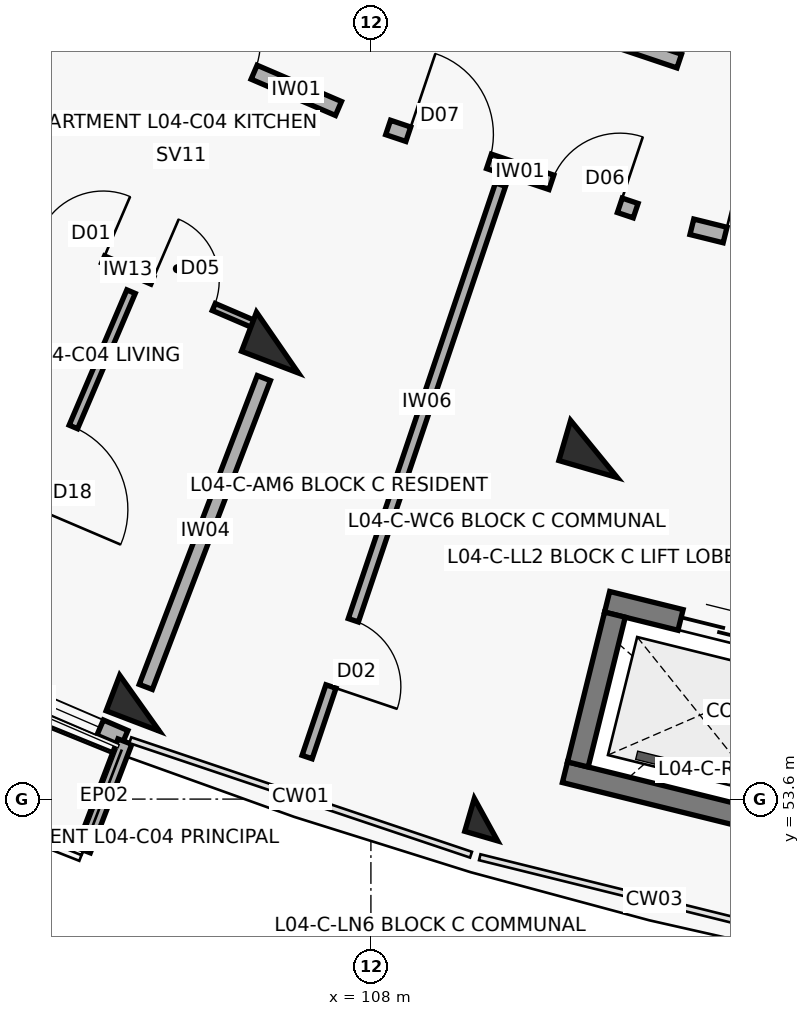
"""IFC4 building model, lengths in metres.
Left out: names, types, materials, properties, quantities, classifications, styles, units other than length and angle.
Written with IfcOpenShell. Run it as: python <this file> out.ifc"""

import sys

from ifc_helpers import new_model, si_unit, direction, frame, frame_2d, origin, origin_2d, place, context, subcontext, project, spatial, rectangle, extrude, element, fill, save


model = new_model("IFC4")
c1 = context("Model", 3, precision=1e-05, world=origin(), true_north=direction((0.0, 1.0)))
c2 = subcontext(c1, "Body", "Model", "MODEL_VIEW")
j1 = project(units=[si_unit("LENGTHUNIT", "METRE"), si_unit("PLANEANGLEUNIT", "RADIAN")], contexts=[c1])
p1 = place(None, origin())
s1 = spatial("IfcSite", under=j1, at=p1, CompositionType="ELEMENT")
p2 = place(p1, origin())
s2 = spatial("IfcBuilding", under=s1, at=p2, CompositionType="ELEMENT")
p3 = place(p2, frame((0.0, 0.0, 14.3)))
s3 = spatial("IfcBuildingStorey", under=s2, at=p3, CompositionType="ELEMENT", Elevation=14.3)
p4 = place(p3, frame((106.77, 59.606, 0.0), z_axis=(0.0, 0.0, 1.0), x_axis=(-0.357064076459, -0.934079892355, 0.0)))
e1 = element("IfcColumn", 1, at=p4, inside=s3, PredefinedType="COLUMN", context=c2, shape_type="SweptSolid", body=[
    extrude(rectangle(XDim=0.55, YDim=0.8, at=origin_2d()), origin(), (0.0, 0.0, 1.0), 3.1),
])
p5 = place(p3, frame((104.956, 54.861, 0.0), z_axis=(0.0, 0.0, 1.0), x_axis=(-0.357064076459, -0.934079892355, 0.0)))
e2 = element("IfcColumn", 2, at=p5, inside=s3, PredefinedType="COLUMN", context=c2, shape_type="SweptSolid", body=[
    extrude(rectangle(XDim=0.5, YDim=0.75, at=origin_2d()), origin(), (0.0, 0.0, 1.0), 3.1),
])
p6 = place(p3, frame((110.934, 58.207, 0.0), z_axis=(0.0, 0.0, 1.0), x_axis=(-0.27966144946, -0.96009867914, 0.0)))
e3 = element("IfcColumn", 3, at=p6, inside=s3, PredefinedType="COLUMN", context=c2, shape_type="SweptSolid", body=[
    extrude(rectangle(XDim=0.55, YDim=0.8, at=origin_2d()), origin(), (0.0, 0.0, 1.0), 3.1),
])
p7 = place(p3, frame((109.513, 53.329, 0.0), z_axis=(0.0, 0.0, 1.0), x_axis=(-0.27966144946, -0.96009867914, 0.0)))
e4 = element("IfcColumn", 4, at=p7, inside=s3, PredefinedType="COLUMN", context=c2, shape_type="SweptSolid", body=[
    extrude(rectangle(XDim=0.45, YDim=0.45, at=origin_2d()), origin(), (0.0, 0.0, 1.0), 3.1),
])
p8 = place(p3, frame((100.341, 56.301, 0.0), z_axis=(0.0, 0.0, 1.0), x_axis=(0.918737524932, -0.39486878869, 0.0)))
e5 = element("IfcWall", 5, at=p8, inside=s3, PredefinedType="SOLIDWALL", context=c2, shape_type="SweptSolid", body=[
    extrude(rectangle(XDim=4.809, YDim=0.218, at=frame_2d((2.405, 0.0))), origin(), (0.0, 0.0, 1.0), 2.25),
])
p9 = place(p8, frame((0.4, 0.0, 0.0)))
e6 = element("IfcOpeningElement", 6, at=p9, cuts=e5, PredefinedType="OPENING", context=c2, shape_type="SweptSolid", body=[
    extrude(rectangle(XDim=1.1, YDim=2.15, at=frame_2d((0.55, 1.075))), frame((0.0, 0.119, 0.0), z_axis=(0.0, -1.0, 0.0), x_axis=(1.0, 0.0, 0.0)), (0.0, 0.0, 1.0), 0.238),
])
p10 = place(p8, frame((2.659, 0.0, 0.35)))
e7 = element("IfcOpeningElement", 7, at=p10, cuts=e5, PredefinedType="OPENING", context=c2, shape_type="SweptSolid", body=[
    extrude(rectangle(XDim=1.8, YDim=1.65, at=frame_2d((0.9, 0.825))), frame((0.0, 0.119, 0.0), z_axis=(0.0, -1.0, 0.0), x_axis=(1.0, 0.0, 0.0)), (0.0, 0.0, 1.0), 0.238),
])
p11 = place(p3, frame((104.763, 54.357, 0.0), z_axis=(0.0, 0.0, 1.0), x_axis=(-0.356957296461, -0.934120703391, 0.0)))
e8 = element("IfcWall", 8, at=p11, inside=s3, PredefinedType="PARAPET", context=c2, shape_type="SweptSolid", body=[
    extrude(rectangle(XDim=1.53, YDim=0.195, at=frame_2d((0.765, 0.0))), origin(), (0.0, 0.0, 1.0), 2.25),
])
p12 = place(p3, frame((111.108, 56.196, 0.0), z_axis=(0.0, 0.0, 1.0), x_axis=(0.970706856107, -0.240266933861, 0.0)))
e9 = element("IfcWall", 9, at=p12, inside=s3, PredefinedType="SHEAR", context=c2, shape_type="SweptSolid", body=[
    extrude(rectangle(XDim=3.09, YDim=0.28, at=frame_2d((1.545, 0.0))), origin(), (0.0, 0.0, 1.0), 3.1),
])
p13 = place(p12, frame((0.995, 0.0, 0.0)))
e10 = element("IfcOpeningElement", 10, at=p13, cuts=e9, PredefinedType="OPENING", context=c2, shape_type="SweptSolid", body=[
    extrude(rectangle(XDim=1.1, YDim=2.15, at=frame_2d((0.55, 1.075))), frame((0.0, 0.15, 0.0), z_axis=(0.0, -1.0, 0.0), x_axis=(1.0, 0.0, 0.0)), (0.0, 0.0, 1.0), 0.3),
])
p14 = place(p3, frame((110.553, 53.954, 0.0), z_axis=(0.0, 0.0, 1.0), x_axis=(0.970725280816, -0.240192483614, 0.0)))
e11 = element("IfcWall", 11, at=p14, inside=s3, PredefinedType="SHEAR", context=c2, shape_type="SweptSolid", body=[
    extrude(rectangle(XDim=3.09, YDim=0.28, at=frame_2d((1.545, 0.0))), origin(), (0.0, 0.0, 1.0), 3.1),
])
p15 = place(p3, frame((111.21, 56.027, 0.0), z_axis=(0.0, 0.0, 1.0), x_axis=(-0.240186044774, -0.970726873995, 0.0)))
e12 = element("IfcWall", 12, at=p15, inside=s3, PredefinedType="SHEAR", context=c2, shape_type="SweptSolid", body=[
    extrude(rectangle(XDim=2.03, YDim=0.28, at=frame_2d((1.015, 0.0))), origin(), (0.0, 0.0, 1.0), 3.1),
])
p16 = place(p3, frame((104.417, 64.044, 0.0), z_axis=(0.0, 0.0, 1.0), x_axis=(0.918718172399, -0.394913813008, 0.0)))
e13 = element("IfcWall", 13, at=p16, inside=s3, PredefinedType="SOLIDWALL", context=c2, shape_type="SweptSolid", body=[
    extrude(rectangle(XDim=3.436, YDim=0.2, at=frame_2d((1.718, 0.0))), origin(), (0.0, 0.0, 1.0), 2.08),
])
p17 = place(p16, frame((1.208, 0.0, 0.0)))
e14 = element("IfcOpeningElement", 14, at=p17, cuts=e13, PredefinedType="OPENING", context=c2, shape_type="SweptSolid", body=[
    extrude(rectangle(XDim=1.02, YDim=2.15, at=frame_2d((0.51, 1.075))), frame((0.0, 0.11, 0.0), z_axis=(0.0, -1.0, 0.0), x_axis=(1.0, 0.0, 0.0)), (0.0, 0.0, 1.0), 0.22),
])
p18 = place(p3, frame((103.052, 61.313, 0.0), z_axis=(0.0, 0.0, 1.0), x_axis=(0.918714121981, -0.39492323567, 0.0)))
e15 = element("IfcWall", 15, at=p18, inside=s3, PredefinedType="PARTITIONING", context=c2, shape_type="SweptSolid", body=[
    extrude(rectangle(XDim=3.785, YDim=0.1, at=frame_2d((1.893, 0.0))), origin(), (0.0, 0.0, 1.0), 2.08),
])
p19 = place(p18, frame((0.65, 0.0, 0.0)))
e16 = element("IfcOpeningElement", 16, at=p19, cuts=e15, PredefinedType="OPENING", context=c2, shape_type="SweptSolid", body=[
    extrude(rectangle(XDim=0.9, YDim=2.1, at=frame_2d((0.45, 1.05))), frame((0.0, 0.06, 0.0), z_axis=(0.0, -1.0, 0.0), x_axis=(1.0, 0.0, 0.0)), (0.0, 0.0, 1.0), 0.12),
])
p20 = place(p18, frame((2.255, 0.0, 0.0)))
e17 = element("IfcOpeningElement", 17, at=p20, cuts=e15, PredefinedType="OPENING", context=c2, shape_type="SweptSolid", body=[
    extrude(rectangle(XDim=0.88, YDim=2.1, at=frame_2d((0.44, 1.05))), frame((0.0, 0.06, 0.0), z_axis=(0.0, -1.0, 0.0), x_axis=(1.0, 0.0, 0.0)), (0.0, 0.0, 1.0), 0.12),
])
p21 = place(p3, frame((104.844, 60.277, 0.0), z_axis=(0.0, 0.0, 1.0), x_axis=(-0.392127280422, -0.919910971751, 0.0)))
e18 = element("IfcWall", 18, at=p21, inside=s3, PredefinedType="PARTITIONING", context=c2, shape_type="SweptSolid", body=[
    extrude(rectangle(XDim=5.05, YDim=0.12, at=frame_2d((2.525, 0.0))), origin(), (0.0, 0.0, 1.0), 2.08),
])
p22 = place(p21, frame((1.935, 0.0, 0.0)))
e19 = element("IfcOpeningElement", 19, at=p22, cuts=e18, PredefinedType="OPENING", context=c2, shape_type="SweptSolid", body=[
    extrude(rectangle(XDim=1.18, YDim=2.1, at=frame_2d((0.59, 1.05))), frame((0.0, 0.07, 0.0), z_axis=(0.0, -1.0, 0.0), x_axis=(1.0, 0.0, 0.0)), (0.0, 0.0, 1.0), 0.14),
])
p23 = place(p3, frame((108.227, 62.437, 0.0), z_axis=(0.0, 0.0, 1.0), x_axis=(0.947884468821, -0.318614239745, 0.0)))
e20 = element("IfcWall", 20, at=p23, inside=s3, PredefinedType="SOLIDWALL", context=c2, shape_type="SweptSolid", body=[
    extrude(rectangle(XDim=3.436, YDim=0.2, at=frame_2d((1.718, 0.0))), origin(), (0.0, 0.0, 1.0), 2.08),
])
p24 = place(p23, frame((0.28, 0.0, 0.0)))
e21 = element("IfcOpeningElement", 21, at=p24, cuts=e20, PredefinedType="OPENING", context=c2, shape_type="SweptSolid", body=[
    extrude(rectangle(XDim=1.12, YDim=2.15, at=frame_2d((0.56, 1.075))), frame((0.0, 0.11, 0.0), z_axis=(0.0, -1.0, 0.0), x_axis=(1.0, 0.0, 0.0)), (0.0, 0.0, 1.0), 0.22),
])
p25 = place(p23, frame((2.266, 0.0, 0.0)))
e22 = element("IfcOpeningElement", 22, at=p25, cuts=e20, PredefinedType="OPENING", context=c2, shape_type="SweptSolid", body=[
    extrude(rectangle(XDim=0.95, YDim=2.1, at=frame_2d((0.475, 1.05))), frame((0.0, 0.11, 0.0), z_axis=(0.0, -1.0, 0.0), x_axis=(1.0, 0.0, 0.0)), (0.0, 0.0, 1.0), 0.22),
])
p26 = place(p3, frame((108.958, 64.352, 0.0), z_axis=(0.0, 0.0, 1.0), x_axis=(0.94787351033, -0.318646839643, 0.0)))
e23 = element("IfcWall", 23, at=p26, inside=s3, PredefinedType="SOLIDWALL", context=c2, shape_type="SweptSolid", body=[
    extrude(rectangle(XDim=3.269, YDim=0.19, at=frame_2d((1.634, 0.0))), origin(), (0.0, 0.0, 1.0), 2.08),
])
p27 = place(p26, frame((1.164, 0.0, 0.0)))
e24 = element("IfcOpeningElement", 24, at=p27, cuts=e23, PredefinedType="OPENING", context=c2, shape_type="SweptSolid", body=[
    extrude(rectangle(XDim=0.94, YDim=2.1, at=frame_2d((0.47, 1.05))), frame((0.0, 0.105, 0.0), z_axis=(0.0, -1.0, 0.0), x_axis=(1.0, 0.0, 0.0)), (0.0, 0.0, 1.0), 0.21),
])
p28 = place(p3, frame((109.705, 61.685, 0.0), z_axis=(0.0, 0.0, 1.0), x_axis=(-0.320057771325, -0.947398027766, 0.0)))
e25 = element("IfcWall", 25, at=p28, inside=s3, PredefinedType="PARTITIONING", context=c2, shape_type="SweptSolid", body=[
    extrude(rectangle(XDim=7.95, YDim=0.14, at=frame_2d((3.975, 0.0))), origin(), (0.0, 0.0, 1.0), 2.08),
])
p29 = place(p28, frame((6.05, 0.0, 0.0)))
e26 = element("IfcOpeningElement", 26, at=p29, cuts=e25, PredefinedType="OPENING", context=c2, shape_type="SweptSolid", body=[
    extrude(rectangle(XDim=0.92, YDim=2.1, at=frame_2d((0.46, 1.05))), frame((0.0, 0.08, 0.0), z_axis=(0.0, -1.0, 0.0), x_axis=(1.0, 0.0, 0.0)), (0.0, 0.0, 1.0), 0.16),
])
p30 = place(p3, frame((106.591, 59.139, 0.0), z_axis=(0.0, 0.0, 1.0), x_axis=(-0.357064016205, -0.934079915388, 0.0)))
e27 = element("IfcWall", 27, at=p30, inside=s3, PredefinedType="SOLIDWALL", context=c2, shape_type="SweptSolid", body=[
    extrude(rectangle(XDim=4.35, YDim=0.185, at=frame_2d((2.175, 0.0))), origin(), (0.0, 0.0, 1.0), 2.08),
])
p31 = place(p3, frame((112.223, 61.13, 0.0), z_axis=(0.0, 0.0, 1.0), x_axis=(0.970719238682, -0.240216901263, 0.0)))
e28 = element("IfcWall", 28, at=p31, inside=s3, PredefinedType="SOLIDWALL", context=c2, shape_type="SweptSolid", body=[
    extrude(rectangle(XDim=3.296, YDim=0.21, at=frame_2d((1.648, 0.0))), origin(), (0.0, 0.0, 1.0), 2.08),
])
p32 = place(p31, frame((0.45, 0.0, 0.0)))
e29 = element("IfcOpeningElement", 29, at=p32, cuts=e28, PredefinedType="OPENING", context=c2, shape_type="SweptSolid", body=[
    extrude(rectangle(XDim=1.1, YDim=2.15, at=frame_2d((0.55, 1.075))), frame((0.0, 0.115, 0.0), z_axis=(0.0, -1.0, 0.0), x_axis=(1.0, 0.0, 0.0)), (0.0, 0.0, 1.0), 0.23),
])
p33 = place(p31, frame((1.726, 0.0, 0.0)))
e30 = element("IfcOpeningElement", 30, at=p33, cuts=e28, PredefinedType="OPENING", context=c2, shape_type="SweptSolid", body=[
    extrude(rectangle(XDim=1.12, YDim=2.15, at=frame_2d((0.56, 1.075))), frame((0.0, 0.115, 0.0), z_axis=(0.0, -1.0, 0.0), x_axis=(1.0, 0.0, 0.0)), (0.0, 0.0, 1.0), 0.23),
])
p34 = place(p10, origin())
e31 = element("IfcWindow", 31, at=p34, inside=s3, PartitioningType="TRIPLE_PANEL_VERTICAL", PredefinedType="WINDOW", context=c2, shape_type="SweptSolid", body=[
    extrude(rectangle(XDim=1.8, YDim=1.65, at=frame_2d((0.9, 0.825))), frame((0.0, 0.03, 0.0), z_axis=(0.0, -1.0, 0.0), x_axis=(1.0, 0.0, 0.0)), (0.0, 0.0, 1.0), 0.06),
])
fill(e7, e31)
p35 = place(p13, origin())
e32 = element("IfcDoor", 32, at=p35, inside=s3, OperationType="DOUBLE_DOOR_SLIDING", PredefinedType="DOOR", context=c2, shape_type="SweptSolid", body=[
    extrude(rectangle(XDim=1.1, YDim=2.15, at=frame_2d((0.55, 1.075))), frame((0.0, 0.025, 0.0), z_axis=(0.0, -1.0, 0.0), x_axis=(1.0, 0.0, 0.0)), (0.0, 0.0, 1.0), 0.05),
])
fill(e10, e32)
p36 = place(p17, origin())
e33 = element("IfcDoor", 33, at=p36, inside=s3, OperationType="SINGLE_SWING_LEFT", PredefinedType="DOOR", context=c2, shape_type="SweptSolid", body=[
    extrude(rectangle(XDim=1.02, YDim=2.15, at=frame_2d((0.51, 1.075))), frame((0.0, 0.025, 0.0), z_axis=(0.0, -1.0, 0.0), x_axis=(1.0, 0.0, 0.0)), (0.0, 0.0, 1.0), 0.05),
])
fill(e14, e33)
p37 = place(p19, origin())
e34 = element("IfcDoor", 34, at=p37, inside=s3, OperationType="SINGLE_SWING_RIGHT", PredefinedType="DOOR", context=c2, shape_type="SweptSolid", body=[
    extrude(rectangle(XDim=0.9, YDim=2.1, at=frame_2d((0.45, 1.05))), frame((0.0, 0.025, 0.0), z_axis=(0.0, -1.0, 0.0), x_axis=(1.0, 0.0, 0.0)), (0.0, 0.0, 1.0), 0.05),
])
fill(e16, e34)
p38 = place(p20, origin())
e35 = element("IfcDoor", 35, at=p38, inside=s3, OperationType="SINGLE_SWING_LEFT", PredefinedType="DOOR", context=c2, shape_type="SweptSolid", body=[
    extrude(rectangle(XDim=0.88, YDim=2.1, at=frame_2d((0.44, 1.05))), frame((0.0, 0.025, 0.0), z_axis=(0.0, -1.0, 0.0), x_axis=(1.0, 0.0, 0.0)), (0.0, 0.0, 1.0), 0.05),
])
fill(e17, e35)
p39 = place(p22, origin())
e36 = element("IfcDoor", 36, at=p39, inside=s3, OperationType="SINGLE_SWING_RIGHT", PredefinedType="DOOR", context=c2, shape_type="SweptSolid", body=[
    extrude(rectangle(XDim=1.18, YDim=2.1, at=frame_2d((0.59, 1.05))), frame((0.0, 0.025, 0.0), z_axis=(0.0, -1.0, 0.0), x_axis=(1.0, 0.0, 0.0)), (0.0, 0.0, 1.0), 0.05),
])
fill(e19, e36)
p40 = place(p24, origin())
e37 = element("IfcDoor", 37, at=p40, inside=s3, OperationType="SINGLE_SWING_LEFT", PredefinedType="DOOR", context=c2, shape_type="SweptSolid", body=[
    extrude(rectangle(XDim=1.12, YDim=2.15, at=frame_2d((0.56, 1.075))), frame((0.0, 0.025, 0.0), z_axis=(0.0, -1.0, 0.0), x_axis=(1.0, 0.0, 0.0)), (0.0, 0.0, 1.0), 0.05),
])
fill(e21, e37)
p41 = place(p25, origin())
e38 = element("IfcDoor", 38, at=p41, inside=s3, OperationType="SINGLE_SWING_RIGHT", PredefinedType="DOOR", context=c2, shape_type="SweptSolid", body=[
    extrude(rectangle(XDim=0.95, YDim=2.1, at=frame_2d((0.475, 1.05))), frame((0.0, 0.025, 0.0), z_axis=(0.0, -1.0, 0.0), x_axis=(1.0, 0.0, 0.0)), (0.0, 0.0, 1.0), 0.05),
])
fill(e22, e38)
p42 = place(p29, origin())
e39 = element("IfcDoor", 39, at=p42, inside=s3, OperationType="SINGLE_SWING_RIGHT", PredefinedType="DOOR", context=c2, shape_type="SweptSolid", body=[
    extrude(rectangle(XDim=0.92, YDim=2.1, at=frame_2d((0.46, 1.05))), frame((0.0, 0.025, 0.0), z_axis=(0.0, -1.0, 0.0), x_axis=(1.0, 0.0, 0.0)), (0.0, 0.0, 1.0), 0.05),
])
fill(e26, e39)
p43 = place(p32, origin())
e40 = element("IfcDoor", 40, at=p43, inside=s3, OperationType="SINGLE_SWING_LEFT", PredefinedType="DOOR", context=c2, shape_type="SweptSolid", body=[
    extrude(rectangle(XDim=1.1, YDim=2.15, at=frame_2d((0.55, 1.075))), frame((0.0, 0.025, 0.0), z_axis=(0.0, -1.0, 0.0), x_axis=(1.0, 0.0, 0.0)), (0.0, 0.0, 1.0), 0.05),
])
fill(e29, e40)
save(model, sys.argv[1])
